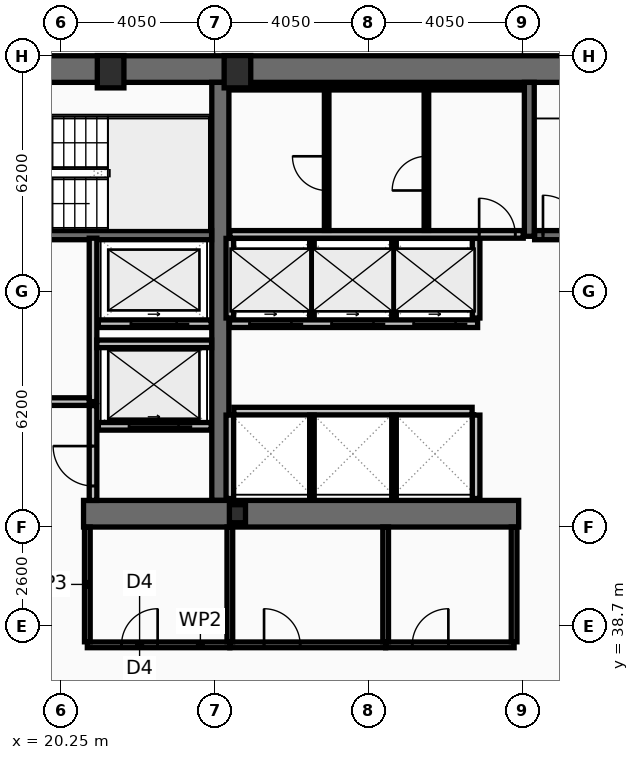
"""IFC4 building model, lengths in metres.
Left out: names, types, materials, properties, quantities, classifications, styles, units other than length and angle.
Written with IfcOpenShell. Run it as: python <this file> out.ifc"""

import sys

from ifc_helpers import new_model, si_unit, direction, frame, frame_2d, origin, origin_2d, place, context, subcontext, project, spatial, rectangle, hollow_rectangle, i_section, extrude, element, fill, save


model = new_model("IFC4")
c1 = context("Model", 3, precision=1e-05, world=origin(), true_north=direction((0.0, 1.0)))
c2 = subcontext(c1, "Body", "Model", "MODEL_VIEW")
j1 = project(units=[si_unit("LENGTHUNIT", "METRE"), si_unit("PLANEANGLEUNIT", "RADIAN")], contexts=[c1])
p1 = place(None, origin())
s1 = spatial("IfcSite", under=j1, at=p1, CompositionType="ELEMENT")
p2 = place(p1, origin())
s2 = spatial("IfcBuilding", under=s1, at=p2, CompositionType="ELEMENT")
p3 = place(p2, frame((0.0, 0.0, 102.6)))
s3 = spatial("IfcBuildingStorey", under=s2, at=p3, CompositionType="ELEMENT", Elevation=102.6)
p4 = place(p3, frame((16.2, 53.35, 0.0), z_axis=(0.0, 0.0, 1.0), x_axis=(1.0, 0.0, 0.0)))
e1 = element("IfcWall", 1, at=p4, inside=s3, PredefinedType="SHEAR", context=c2, shape_type="SweptSolid", body=[
    extrude(rectangle(XDim=40.5, YDim=0.7, at=frame_2d((20.25, 0.0))), origin(), (0.0, 0.0, 1.0), 3.8),
])
p5 = place(p3, frame((24.45, 42.0, 0.0), z_axis=(0.0, 0.0, 1.0), x_axis=(0.0, 1.0, 0.0)))
e2 = element("IfcWall", 2, at=p5, inside=s3, PredefinedType="SHEAR", context=c2, shape_type="SweptSolid", body=[
    extrude(rectangle(XDim=11.0, YDim=0.45, at=frame_2d((5.5, 0.0))), origin(), (0.0, 0.0, 1.0), 3.8),
])
p6 = place(p3, frame((32.3, 41.65, 0.0), z_axis=(0.0, 0.0, 1.0), x_axis=(-1.0, 0.0, 0.0)))
e3 = element("IfcWall", 3, at=p6, inside=s3, PredefinedType="SHEAR", context=c2, shape_type="SweptSolid", body=[
    extrude(rectangle(XDim=11.45, YDim=0.7, at=frame_2d((5.725, 0.0))), origin(), (0.0, 0.0, 1.0), 3.8),
])
p7 = place(p3, frame((32.58, 48.95, 0.0), z_axis=(0.0, 0.0, 1.0), x_axis=(0.0, 1.0, 0.0)))
e4 = element("IfcWall", 4, at=p7, inside=s3, PredefinedType="SHEAR", context=c2, shape_type="SweptSolid", body=[
    extrude(rectangle(XDim=4.05, YDim=0.26, at=frame_2d((2.025, 0.0))), origin(), (0.0, 0.0, 1.0), 3.8),
])
p8 = place(p3, frame((16.9, 48.98, 0.0), z_axis=(0.0, 0.0, 1.0), x_axis=(1.0, 0.0, 0.0)))
e5 = element("IfcWall", 5, at=p8, inside=s3, PredefinedType="SHEAR", context=c2, shape_type="SweptSolid", body=[
    extrude(rectangle(XDim=7.32, YDim=0.24, at=frame_2d((3.66, 0.0))), origin(), (0.0, 0.0, 1.0), 3.8),
])
p9 = place(p8, frame((0.22, 0.0, 0.0)))
e6 = element("IfcOpeningElement", 6, at=p9, cuts=e5, PredefinedType="OPENING", context=c2, shape_type="SweptSolid", body=[
    extrude(rectangle(XDim=1.05, YDim=2.15, at=frame_2d((0.525, 1.075))), frame((0.0, 0.13, 0.0), z_axis=(0.0, -1.0, 0.0), x_axis=(1.0, 0.0, 0.0)), (0.0, 0.0, 1.0), 0.26),
])
p10 = place(p3, frame((32.72, 48.98, 0.0), z_axis=(0.0, 0.0, 1.0), x_axis=(1.0, 0.0, 0.0)))
e7 = element("IfcWall", 7, at=p10, inside=s3, PredefinedType="SHEAR", context=c2, shape_type="SweptSolid", body=[
    extrude(rectangle(XDim=7.56, YDim=0.24, at=frame_2d((3.78, 0.0))), origin(), (0.0, 0.0, 1.0), 3.8),
])
p11 = place(p10, frame((0.22, 0.0, 0.0)))
e8 = element("IfcOpeningElement", 8, at=p11, cuts=e7, PredefinedType="OPENING", context=c2, shape_type="SweptSolid", body=[
    extrude(rectangle(XDim=1.05, YDim=2.15, at=frame_2d((0.525, 1.075))), frame((0.0, 0.13, 0.0), z_axis=(0.0, -1.0, 0.0), x_axis=(1.0, 0.0, 0.0)), (0.0, 0.0, 1.0), 0.26),
])
for number, where, z_axis, x_axis in (
    (9, (21.562, 53.28, 0.0), (0.0, 0.0, 1.0), (1.0, 0.0, 0.0)),
    (10, (24.9, 53.28, 0.0), (0.0, 0.0, 1.0), (1.0, 0.0, 0.0)),
):
    element("IfcColumn", number, at=place(p3, frame(where, z_axis=z_axis, x_axis=x_axis)), inside=s3, PredefinedType="COLUMN", context=c2, shape_type="SweptSolid", body=[
        extrude(hollow_rectangle(XDim=0.7, YDim=0.85, WallThickness=0.05, at=origin_2d()), origin(), (0.0, 0.0, 1.0), 4.0),
    ])
p12 = place(p3, frame((24.9, 41.65, 0.0), z_axis=(0.0, 0.0, 1.0), x_axis=(1.0, 0.0, 0.0)))
e11 = element("IfcColumn", 11, at=p12, inside=s3, PredefinedType="COLUMN", context=c2, shape_type="SweptSolid", body=[
    extrude(i_section(OverallWidth=0.424, OverallDepth=0.474, WebThickness=0.048, FlangeThickness=0.077, at=origin_2d()), origin(), (0.0, 0.0, 1.0), 4.0),
])
p13 = place(p3, frame((24.21, 43.95, 0.0), z_axis=(0.0, 0.0, 1.0), x_axis=(-1.0, 0.0, 0.0)))
e12 = element("IfcWall", 12, at=p13, inside=s3, PredefinedType="PARTITIONING", context=c2, shape_type="SweptSolid", body=[
    extrude(rectangle(XDim=2.97, YDim=0.2, at=frame_2d((1.485, 0.0))), origin(), (0.0, 0.0, 1.0), 3.8),
])
p14 = place(p13, frame((0.86, 0.0, 0.0)))
e13 = element("IfcOpeningElement", 13, at=p14, cuts=e12, PredefinedType="OPENING", context=c2, shape_type="SweptSolid", body=[
    extrude(rectangle(XDim=1.3, YDim=2.18, at=frame_2d((0.65, 1.09))), frame((0.0, 0.11, 0.0), z_axis=(0.0, -1.0, 0.0), x_axis=(1.0, 0.0, 0.0)), (0.0, 0.0, 1.0), 0.22),
])
p15 = place(p3, frame((24.21, 46.65, 0.0), z_axis=(0.0, 0.0, 1.0), x_axis=(-1.0, 0.0, 0.0)))
e14 = element("IfcWall", 14, at=p15, inside=s3, PredefinedType="PARTITIONING", context=c2, shape_type="SweptSolid", body=[
    extrude(rectangle(XDim=2.97, YDim=0.2, at=frame_2d((1.485, 0.0))), origin(), (0.0, 0.0, 1.0), 3.8),
])
p16 = place(p15, frame((0.91, 0.0, 0.0)))
e15 = element("IfcOpeningElement", 15, at=p16, cuts=e14, PredefinedType="OPENING", context=c2, shape_type="SweptSolid", body=[
    extrude(rectangle(XDim=1.2, YDim=2.18, at=frame_2d((0.6, 1.09))), frame((0.0, 0.11, 0.0), z_axis=(0.0, -1.0, 0.0), x_axis=(1.0, 0.0, 0.0)), (0.0, 0.0, 1.0), 0.22),
])
p17 = place(p3, frame((31.22, 46.65, 0.0), z_axis=(0.0, 0.0, 1.0), x_axis=(-1.0, 0.0, 0.0)))
e16 = element("IfcWall", 16, at=p17, inside=s3, PredefinedType="PARTITIONING", context=c2, shape_type="SweptSolid", body=[
    extrude(rectangle(XDim=6.53, YDim=0.2, at=frame_2d((3.265, 0.0))), origin(), (0.0, 0.0, 1.0), 3.8),
])
p18 = place(p17, frame((4.9, 0.0, 0.0)))
e17 = element("IfcOpeningElement", 17, at=p18, cuts=e16, PredefinedType="OPENING", context=c2, shape_type="SweptSolid", body=[
    extrude(rectangle(XDim=1.1, YDim=2.18, at=frame_2d((0.55, 1.09))), frame((0.0, 0.11, 0.0), z_axis=(0.0, -1.0, 0.0), x_axis=(1.0, 0.0, 0.0)), (0.0, 0.0, 1.0), 0.22),
])
p19 = place(p17, frame((2.74, 0.0, 0.0)))
e18 = element("IfcOpeningElement", 18, at=p19, cuts=e16, PredefinedType="OPENING", context=c2, shape_type="SweptSolid", body=[
    extrude(rectangle(XDim=1.1, YDim=2.18, at=frame_2d((0.55, 1.09))), frame((0.0, 0.11, 0.0), z_axis=(0.0, -1.0, 0.0), x_axis=(1.0, 0.0, 0.0)), (0.0, 0.0, 1.0), 0.22),
])
p20 = place(p17, frame((0.58, 0.0, 0.0)))
e19 = element("IfcOpeningElement", 19, at=p20, cuts=e16, PredefinedType="OPENING", context=c2, shape_type="SweptSolid", body=[
    extrude(rectangle(XDim=1.1, YDim=2.18, at=frame_2d((0.55, 1.09))), frame((0.0, 0.11, 0.0), z_axis=(0.0, -1.0, 0.0), x_axis=(1.0, 0.0, 0.0)), (0.0, 0.0, 1.0), 0.22),
])
p21 = place(p3, frame((21.1, 44.6, 0.0), z_axis=(0.0, 0.0, 1.0), x_axis=(0.0, 1.0, 0.0)))
e20 = element("IfcWall", 20, at=p21, inside=s3, PredefinedType="PARTITIONING", context=c2, shape_type="SweptSolid", body=[
    extrude(rectangle(XDim=4.3, YDim=0.2, at=frame_2d((2.15, 0.0))), origin(), (0.0, 0.0, 1.0), 3.8),
])
p22 = place(p3, frame((16.9, 44.6, 0.0), z_axis=(0.0, 0.0, 1.0), x_axis=(1.0, 0.0, 0.0)))
e21 = element("IfcWall", 21, at=p22, inside=s3, PredefinedType="PARTITIONING", context=c2, shape_type="SweptSolid", body=[
    extrude(rectangle(XDim=4.1, YDim=0.2, at=frame_2d((2.05, 0.0))), origin(), (0.0, 0.0, 1.0), 3.8),
])
p23 = place(p22, frame((1.25, 0.0, 0.0)))
e22 = element("IfcOpeningElement", 22, at=p23, cuts=e21, PredefinedType="OPENING", context=c2, shape_type="SweptSolid", body=[
    extrude(rectangle(XDim=1.05, YDim=2.15, at=frame_2d((0.525, 1.075))), frame((0.0, 0.11, 0.0), z_axis=(0.0, -1.0, 0.0), x_axis=(1.0, 0.0, 0.0)), (0.0, 0.0, 1.0), 0.22),
])
p24 = place(p3, frame((21.2, 46.12, 0.0), z_axis=(0.0, 0.0, 1.0), x_axis=(1.0, 0.0, 0.0)))
e23 = element("IfcWall", 23, at=p24, inside=s3, PredefinedType="PARTITIONING", context=c2, shape_type="SweptSolid", body=[
    extrude(rectangle(XDim=3.02, YDim=0.2, at=frame_2d((1.51, 0.0))), origin(), (0.0, 0.0, 1.0), 3.8),
])
p25 = place(p3, frame((21.1, 42.0, 0.0), z_axis=(0.0, 0.0, 1.0), x_axis=(0.0, 1.0, 0.0)))
e24 = element("IfcWall", 24, at=p25, inside=s3, PredefinedType="PARTITIONING", context=c2, shape_type="SweptSolid", body=[
    extrude(rectangle(XDim=2.495, YDim=0.2, at=frame_2d((1.248, 0.0))), origin(), (0.0, 0.0, 1.0), 3.8),
])
p26 = place(p25, frame((0.38, 0.0, 0.0)))
e25 = element("IfcOpeningElement", 25, at=p26, cuts=e24, PredefinedType="OPENING", context=c2, shape_type="SweptSolid", body=[
    extrude(rectangle(XDim=1.05, YDim=2.15, at=frame_2d((0.525, 1.075))), frame((0.0, 0.11, 0.0), z_axis=(0.0, -1.0, 0.0), x_axis=(1.0, 0.0, 0.0)), (0.0, 0.0, 1.0), 0.22),
])
for number, where, z_axis, x_axis in (
    (26, (24.7, 46.8, 0.0), (0.0, 0.0, 1.0), (0.0, 1.0, 0.0)),
    (27, (31.18, 46.8, 0.0), (0.0, 0.0, 1.0), (0.0, 1.0, 0.0)),
):
    element("IfcWall", number, at=place(p3, frame(where, z_axis=z_axis, x_axis=x_axis)), inside=s3, PredefinedType="PARTITIONING", context=c2, shape_type="SweptSolid", body=[
        extrude(rectangle(XDim=2.095, YDim=0.2, at=frame_2d((1.047, 0.0))), origin(), (0.0, 0.0, 1.0), 3.8),
    ])
for number, where, z_axis, x_axis in (
    (28, (26.86, 46.8, 0.0), (0.0, 0.0, 1.0), (0.0, 1.0, 0.0)),
    (29, (29.02, 46.8, 0.0), (0.0, 0.0, 1.0), (0.0, 1.0, 0.0)),
):
    element("IfcWall", number, at=place(p3, frame(where, z_axis=z_axis, x_axis=x_axis)), inside=s3, PredefinedType="PARTITIONING", context=c2, shape_type="SweptSolid", body=[
        extrude(rectangle(XDim=2.095, YDim=0.12, at=frame_2d((1.047, 0.0))), origin(), (0.0, 0.0, 1.0), 3.8),
    ])
p27 = place(p3, frame((24.805, 44.35, 0.0), z_axis=(0.0, 0.0, 1.0), x_axis=(1.0, 0.0, 0.0)))
e30 = element("IfcWall", 30, at=p27, inside=s3, PredefinedType="PARTITIONING", context=c2, shape_type="SweptSolid", body=[
    extrude(rectangle(XDim=6.27, YDim=0.2, at=frame_2d((3.135, 0.0))), origin(), (0.0, 0.0, 1.0), 3.8),
])
for number, where, z_axis, x_axis in (
    (31, (24.7, 42.05, 0.0), (0.0, 0.0, 1.0), (0.0, 1.0, 0.0)),
    (32, (31.18, 42.05, 0.0), (0.0, 0.0, 1.0), (0.0, 1.0, 0.0)),
):
    element("IfcWall", number, at=place(p3, frame(where, z_axis=z_axis, x_axis=x_axis)), inside=s3, PredefinedType="PARTITIONING", context=c2, shape_type="SweptSolid", body=[
        extrude(rectangle(XDim=2.195, YDim=0.2, at=frame_2d((1.098, 0.0))), origin(), (0.0, 0.0, 1.0), 3.8),
    ])
for number, where, z_axis, x_axis in (
    (33, (26.86, 42.05, 0.0), (0.0, 0.0, 1.0), (0.0, 1.0, 0.0)),
    (34, (29.02, 42.05, 0.0), (0.0, 0.0, 1.0), (0.0, 1.0, 0.0)),
):
    element("IfcWall", number, at=place(p3, frame(where, z_axis=z_axis, x_axis=x_axis)), inside=s3, PredefinedType="PARTITIONING", context=c2, shape_type="SweptSolid", body=[
        extrude(rectangle(XDim=2.195, YDim=0.12, at=frame_2d((1.098, 0.0))), origin(), (0.0, 0.0, 1.0), 3.8),
    ])
p28 = place(p3, frame((24.7, 52.86, 0.0), z_axis=(0.0, 0.0, 1.0), x_axis=(1.0, 0.0, 0.0)))
e35 = element("IfcWall", 35, at=p28, inside=s3, PredefinedType="PARTITIONING", context=c2, shape_type="SweptSolid", body=[
    extrude(rectangle(XDim=7.72, YDim=0.12, at=frame_2d((3.86, 0.0))), origin(), (0.0, 0.0, 1.0), 3.8),
])
p29 = place(p3, frame((24.7, 49.0, 0.0), z_axis=(0.0, 0.0, 1.0), x_axis=(1.0, 0.0, 0.0)))
e36 = element("IfcWall", 36, at=p29, inside=s3, PredefinedType="PARTITIONING", context=c2, shape_type="SweptSolid", body=[
    extrude(rectangle(XDim=7.72, YDim=0.2, at=frame_2d((3.86, 0.0))), origin(), (0.0, 0.0, 1.0), 3.8),
])
p30 = place(p29, frame((6.56, 0.0, 0.0)))
e37 = element("IfcOpeningElement", 37, at=p30, cuts=e36, PredefinedType="OPENING", context=c2, shape_type="SweptSolid", body=[
    extrude(rectangle(XDim=0.95, YDim=2.1, at=frame_2d((0.475, 1.05))), frame((0.0, 0.11, 0.0), z_axis=(0.0, -1.0, 0.0), x_axis=(1.0, 0.0, 0.0)), (0.0, 0.0, 1.0), 0.22),
])
p31 = place(p3, frame((27.248, 49.105, 0.0), z_axis=(0.0, 0.0, 1.0), x_axis=(0.0, 1.0, 0.0)))
e38 = element("IfcWall", 38, at=p31, inside=s3, PredefinedType="PARTITIONING", context=c2, shape_type="SweptSolid", body=[
    extrude(rectangle(XDim=3.69, YDim=0.12, at=frame_2d((1.845, 0.0))), origin(), (0.0, 0.0, 1.0), 3.8),
])
p32 = place(p31, frame((1.05, 0.0, 0.0)))
e39 = element("IfcOpeningElement", 39, at=p32, cuts=e38, PredefinedType="OPENING", context=c2, shape_type="SweptSolid", body=[
    extrude(rectangle(XDim=0.9, YDim=2.05, at=frame_2d((0.45, 1.025))), frame((0.0, 0.07, 0.0), z_axis=(0.0, -1.0, 0.0), x_axis=(1.0, 0.0, 0.0)), (0.0, 0.0, 1.0), 0.14),
])
p33 = place(p3, frame((29.872, 49.105, 0.0), z_axis=(0.0, 0.0, 1.0), x_axis=(0.0, 1.0, 0.0)))
e40 = element("IfcWall", 40, at=p33, inside=s3, PredefinedType="PARTITIONING", context=c2, shape_type="SweptSolid", body=[
    extrude(rectangle(XDim=3.69, YDim=0.12, at=frame_2d((1.845, 0.0))), origin(), (0.0, 0.0, 1.0), 3.8),
])
p34 = place(p33, frame((1.05, 0.0, 0.0)))
e41 = element("IfcOpeningElement", 41, at=p34, cuts=e40, PredefinedType="OPENING", context=c2, shape_type="SweptSolid", body=[
    extrude(rectangle(XDim=0.9, YDim=2.05, at=frame_2d((0.45, 1.025))), frame((0.0, 0.07, 0.0), z_axis=(0.0, -1.0, 0.0), x_axis=(1.0, 0.0, 0.0)), (0.0, 0.0, 1.0), 0.14),
])
p35 = place(p3, frame((20.95, 38.2, 0.0), z_axis=(0.0, 0.0, 1.0), x_axis=(1.0, 0.0, 0.0)))
e42 = element("IfcWall", 42, at=p35, inside=s3, PredefinedType="PARTITIONING", context=c2, shape_type="SweptSolid", body=[
    extrude(rectangle(XDim=3.75, YDim=0.15, at=frame_2d((1.875, 0.0))), origin(), (0.0, 0.0, 1.0), 2.99),
])
p36 = place(p35, frame((0.9, 0.0, 0.0)))
e43 = element("IfcOpeningElement", 43, at=p36, cuts=e42, PredefinedType="OPENING", context=c2, shape_type="SweptSolid", body=[
    extrude(rectangle(XDim=0.95, YDim=2.05, at=frame_2d((0.475, 1.025))), frame((0.0, 0.085, 0.0), z_axis=(0.0, -1.0, 0.0), x_axis=(1.0, 0.0, 0.0)), (0.0, 0.0, 1.0), 0.17),
])
p37 = place(p3, frame((24.7, 38.2, 0.0), z_axis=(0.0, 0.0, 1.0), x_axis=(1.0, 0.0, 0.0)))
e44 = element("IfcWall", 44, at=p37, inside=s3, PredefinedType="PARTITIONING", context=c2, shape_type="SweptSolid", body=[
    extrude(rectangle(XDim=4.1, YDim=0.15, at=frame_2d((2.05, 0.0))), origin(), (0.0, 0.0, 1.0), 2.99),
])
p38 = place(p37, frame((0.9, 0.0, 0.0)))
e45 = element("IfcOpeningElement", 45, at=p38, cuts=e44, PredefinedType="OPENING", context=c2, shape_type="SweptSolid", body=[
    extrude(rectangle(XDim=0.95, YDim=2.05, at=frame_2d((0.475, 1.025))), frame((0.0, 0.085, 0.0), z_axis=(0.0, -1.0, 0.0), x_axis=(1.0, 0.0, 0.0)), (0.0, 0.0, 1.0), 0.17),
])
p39 = place(p3, frame((28.8, 38.2, 0.0), z_axis=(0.0, 0.0, 1.0), x_axis=(1.0, 0.0, 0.0)))
e46 = element("IfcWall", 46, at=p39, inside=s3, PredefinedType="PARTITIONING", context=c2, shape_type="SweptSolid", body=[
    extrude(rectangle(XDim=3.38, YDim=0.15, at=frame_2d((1.69, 0.0))), origin(), (0.0, 0.0, 1.0), 2.99),
])
p40 = place(p39, frame((0.7, 0.0, 0.0)))
e47 = element("IfcOpeningElement", 47, at=p40, cuts=e46, PredefinedType="OPENING", context=c2, shape_type="SweptSolid", body=[
    extrude(rectangle(XDim=0.95, YDim=2.05, at=frame_2d((0.475, 1.025))), frame((0.0, 0.085, 0.0), z_axis=(0.0, -1.0, 0.0), x_axis=(1.0, 0.0, 0.0)), (0.0, 0.0, 1.0), 0.17),
])
p41 = place(p3, frame((20.95, 38.28, 0.0), z_axis=(0.0, 0.0, 1.0), x_axis=(0.0, 1.0, 0.0)))
e48 = element("IfcWall", 48, at=p41, inside=s3, PredefinedType="PARTITIONING", context=c2, shape_type="SweptSolid", body=[
    extrude(rectangle(XDim=3.02, YDim=0.15, at=frame_2d((1.51, 0.0))), origin(), (0.0, 0.0, 1.0), 3.8),
])
p42 = place(p3, frame((24.7, 38.28, 0.0), z_axis=(0.0, 0.0, 1.0), x_axis=(0.0, 1.0, 0.0)))
e49 = element("IfcWall", 49, at=p42, inside=s3, PredefinedType="PARTITIONING", context=c2, shape_type="SweptSolid", body=[
    extrude(rectangle(XDim=3.02, YDim=0.15, at=frame_2d((1.51, 0.0))), origin(), (0.0, 0.0, 1.0), 2.99),
])
for number, where, z_axis, x_axis in (
    (50, (28.8, 38.28, 0.0), (0.0, 0.0, 1.0), (0.0, 1.0, 0.0)),
    (51, (32.18, 38.28, 0.0), (0.0, 0.0, 1.0), (0.0, 1.0, 0.0)),
):
    element("IfcWall", number, at=place(p3, frame(where, z_axis=z_axis, x_axis=x_axis)), inside=s3, PredefinedType="PARTITIONING", context=c2, shape_type="SweptSolid", body=[
        extrude(rectangle(XDim=3.02, YDim=0.15, at=frame_2d((1.51, 0.0))), origin(), (0.0, 0.0, 1.0), 3.8),
    ])
p43 = place(p11, origin())
e52 = element("IfcDoor", 52, at=p43, inside=s3, OperationType="SINGLE_SWING_LEFT", PredefinedType="DOOR", context=c2, shape_type="SweptSolid", body=[
    extrude(rectangle(XDim=1.05, YDim=2.15, at=frame_2d((0.525, 1.075))), frame((0.0, 0.025, 0.0), z_axis=(0.0, -1.0, 0.0), x_axis=(1.0, 0.0, 0.0)), (0.0, 0.0, 1.0), 0.05),
])
fill(e8, e52)
p44 = place(p14, origin())
e53 = element("IfcDoor", 53, at=p44, inside=s3, OperationType="SLIDING_TO_LEFT", PredefinedType="DOOR", context=c2, shape_type="SweptSolid", body=[
    extrude(rectangle(XDim=1.3, YDim=2.18, at=frame_2d((0.65, 1.09))), frame((0.0, 0.025, 0.0), z_axis=(0.0, -1.0, 0.0), x_axis=(1.0, 0.0, 0.0)), (0.0, 0.0, 1.0), 0.05),
])
fill(e13, e53)
p45 = place(p16, origin())
e54 = element("IfcDoor", 54, at=p45, inside=s3, OperationType="SLIDING_TO_LEFT", PredefinedType="DOOR", context=c2, shape_type="SweptSolid", body=[
    extrude(rectangle(XDim=1.2, YDim=2.18, at=frame_2d((0.6, 1.09))), frame((0.0, 0.025, 0.0), z_axis=(0.0, -1.0, 0.0), x_axis=(1.0, 0.0, 0.0)), (0.0, 0.0, 1.0), 0.05),
])
fill(e15, e54)
p46 = place(p18, origin())
e55 = element("IfcDoor", 55, at=p46, inside=s3, OperationType="SLIDING_TO_LEFT", PredefinedType="DOOR", context=c2, shape_type="SweptSolid", body=[
    extrude(rectangle(XDim=1.1, YDim=2.18, at=frame_2d((0.55, 1.09))), frame((0.0, 0.025, 0.0), z_axis=(0.0, -1.0, 0.0), x_axis=(1.0, 0.0, 0.0)), (0.0, 0.0, 1.0), 0.05),
])
fill(e17, e55)
p47 = place(p19, origin())
e56 = element("IfcDoor", 56, at=p47, inside=s3, OperationType="SLIDING_TO_LEFT", PredefinedType="DOOR", context=c2, shape_type="SweptSolid", body=[
    extrude(rectangle(XDim=1.1, YDim=2.18, at=frame_2d((0.55, 1.09))), frame((0.0, 0.025, 0.0), z_axis=(0.0, -1.0, 0.0), x_axis=(1.0, 0.0, 0.0)), (0.0, 0.0, 1.0), 0.05),
])
fill(e18, e56)
p48 = place(p20, origin())
e57 = element("IfcDoor", 57, at=p48, inside=s3, OperationType="SLIDING_TO_LEFT", PredefinedType="DOOR", context=c2, shape_type="SweptSolid", body=[
    extrude(rectangle(XDim=1.1, YDim=2.18, at=frame_2d((0.55, 1.09))), frame((0.0, 0.025, 0.0), z_axis=(0.0, -1.0, 0.0), x_axis=(1.0, 0.0, 0.0)), (0.0, 0.0, 1.0), 0.05),
])
fill(e19, e57)
p49 = place(p26, origin())
e58 = element("IfcDoor", 58, at=p49, inside=s3, OperationType="SINGLE_SWING_RIGHT", PredefinedType="DOOR", context=c2, shape_type="SweptSolid", body=[
    extrude(rectangle(XDim=1.05, YDim=2.15, at=frame_2d((0.525, 1.075))), frame((0.0, 0.025, 0.0), z_axis=(0.0, -1.0, 0.0), x_axis=(1.0, 0.0, 0.0)), (0.0, 0.0, 1.0), 0.05),
])
fill(e25, e58)
p50 = place(p30, origin())
e59 = element("IfcDoor", 59, at=p50, inside=s3, OperationType="SINGLE_SWING_LEFT", PredefinedType="DOOR", context=c2, shape_type="SweptSolid", body=[
    extrude(rectangle(XDim=0.95, YDim=2.1, at=frame_2d((0.475, 1.05))), frame((0.0, 0.025, 0.0), z_axis=(0.0, -1.0, 0.0), x_axis=(1.0, 0.0, 0.0)), (0.0, 0.0, 1.0), 0.05),
])
fill(e37, e59)
p51 = place(p32, origin())
e60 = element("IfcDoor", 60, at=p51, inside=s3, OperationType="SINGLE_SWING_RIGHT", PredefinedType="DOOR", context=c2, shape_type="SweptSolid", body=[
    extrude(rectangle(XDim=0.9, YDim=2.05, at=frame_2d((0.45, 1.025))), frame((0.0, 0.025, 0.0), z_axis=(0.0, -1.0, 0.0), x_axis=(1.0, 0.0, 0.0)), (0.0, 0.0, 1.0), 0.05),
])
fill(e39, e60)
p52 = place(p34, origin())
e61 = element("IfcDoor", 61, at=p52, inside=s3, OperationType="SINGLE_SWING_LEFT", PredefinedType="DOOR", context=c2, shape_type="SweptSolid", body=[
    extrude(rectangle(XDim=0.9, YDim=2.05, at=frame_2d((0.45, 1.025))), frame((0.0, 0.025, 0.0), z_axis=(0.0, -1.0, 0.0), x_axis=(1.0, 0.0, 0.0)), (0.0, 0.0, 1.0), 0.05),
])
fill(e41, e61)
p53 = place(p36, origin())
e62 = element("IfcDoor", 62, at=p53, inside=s3, OperationType="SINGLE_SWING_RIGHT", PredefinedType="DOOR", context=c2, shape_type="SweptSolid", body=[
    extrude(rectangle(XDim=0.95, YDim=2.05, at=frame_2d((0.475, 1.025))), frame((0.0, 0.025, 0.0), z_axis=(0.0, -1.0, 0.0), x_axis=(1.0, 0.0, 0.0)), (0.0, 0.0, 1.0), 0.05),
])
fill(e43, e62)
p54 = place(p38, origin())
e63 = element("IfcDoor", 63, at=p54, inside=s3, OperationType="SINGLE_SWING_LEFT", PredefinedType="DOOR", context=c2, shape_type="SweptSolid", body=[
    extrude(rectangle(XDim=0.95, YDim=2.05, at=frame_2d((0.475, 1.025))), frame((0.0, 0.025, 0.0), z_axis=(0.0, -1.0, 0.0), x_axis=(1.0, 0.0, 0.0)), (0.0, 0.0, 1.0), 0.05),
])
fill(e45, e63)
p55 = place(p40, origin())
e64 = element("IfcDoor", 64, at=p55, inside=s3, OperationType="SINGLE_SWING_RIGHT", PredefinedType="DOOR", context=c2, shape_type="SweptSolid", body=[
    extrude(rectangle(XDim=0.95, YDim=2.05, at=frame_2d((0.475, 1.025))), frame((0.0, 0.025, 0.0), z_axis=(0.0, -1.0, 0.0), x_axis=(1.0, 0.0, 0.0)), (0.0, 0.0, 1.0), 0.05),
])
fill(e47, e64)
save(model, sys.argv[1])
